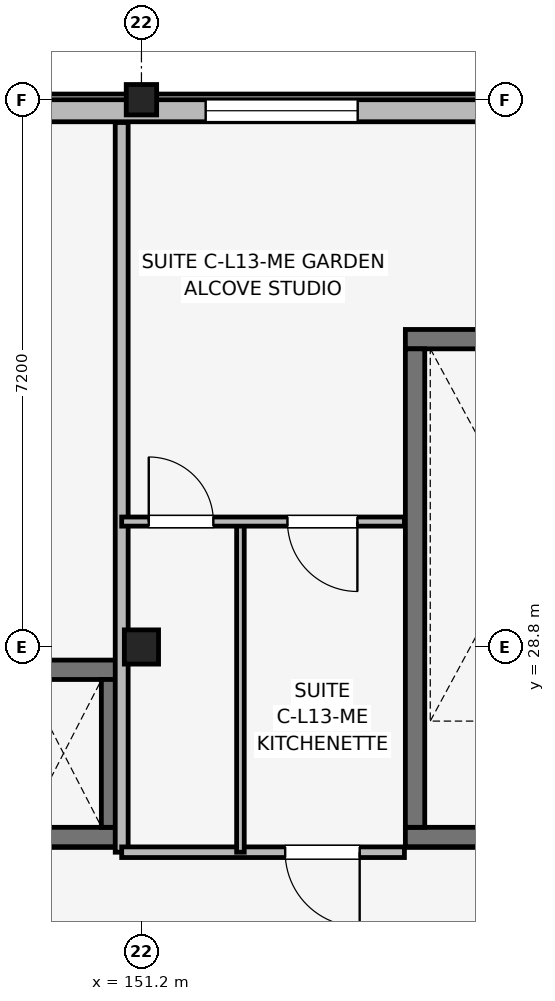
"""IFC4 building model, lengths in metres.
Left out: names, types, materials, properties, quantities, classifications, styles, units other than length and angle.
Written with IfcOpenShell. Run it as: python <this file> out.ifc"""

import sys

from ifc_helpers import new_model, si_unit, direction, frame, frame_2d, origin, origin_2d, place, context, subcontext, project, spatial, rectangle, extrude, element, fill, save


model = new_model("IFC4")
c1 = context("Model", 3, precision=1e-05, world=origin(), true_north=direction((0.0, 1.0)))
c2 = subcontext(c1, "Body", "Model", "MODEL_VIEW")
j1 = project(units=[si_unit("LENGTHUNIT", "METRE"), si_unit("PLANEANGLEUNIT", "RADIAN")], contexts=[c1])
p1 = place(None, origin())
s1 = spatial("IfcSite", under=j1, at=p1, CompositionType="ELEMENT")
p2 = place(p1, origin())
s2 = spatial("IfcBuilding", under=s1, at=p2, CompositionType="ELEMENT")
p3 = place(p2, frame((0.0, 0.0, 43.35)))
s3 = spatial("IfcBuildingStorey", under=s2, at=p3, CompositionType="ELEMENT", Elevation=43.35)
p4 = place(p3, frame((151.2, 28.8, 0.0), z_axis=(0.0, 0.0, 1.0), x_axis=(1.0, 0.0, 0.0)))
e1 = element("IfcColumn", 1, at=p4, inside=s3, PredefinedType="COLUMN", context=c2, shape_type="SweptSolid", body=[
    extrude(rectangle(XDim=0.45, YDim=0.45, at=origin_2d()), origin(), (0.0, 0.0, 1.0), 3.15),
])
p5 = place(p3, frame((151.2, 36.0, 0.0), z_axis=(0.0, 0.0, 1.0), x_axis=(1.0, 0.0, 0.0)))
e2 = element("IfcColumn", 2, at=p5, inside=s3, PredefinedType="COLUMN", context=c2, shape_type="SweptSolid", body=[
    extrude(rectangle(XDim=0.4, YDim=0.4, at=origin_2d()), origin(), (0.0, 0.0, 1.0), 3.15),
])
p6 = place(p3, frame((154.673, 26.3, 0.0), z_axis=(0.0, 0.0, 1.0), x_axis=(1.0, 0.0, 0.0)))
e3 = element("IfcWall", 3, at=p6, inside=s3, PredefinedType="SHEAR", context=c2, shape_type="SweptSolid", body=[
    extrude(rectangle(XDim=3.305, YDim=0.255, at=frame_2d((1.652, 0.0))), origin(), (0.0, 0.0, 1.0), 3.15),
])
p7 = place(p6, frame((1.127, 0.0, 0.0)))
e4 = element("IfcOpeningElement", 4, at=p7, cuts=e3, PredefinedType="OPENING", context=c2, shape_type="SweptSolid", body=[
    extrude(rectangle(XDim=1.05, YDim=2.12, at=frame_2d((0.525, 1.06))), frame((0.0, 0.137, 0.0), z_axis=(0.0, -1.0, 0.0), x_axis=(1.0, 0.0, 0.0)), (0.0, 0.0, 1.0), 0.275),
])
p8 = place(p3, frame((154.673, 32.85, 0.0), z_axis=(0.0, 0.0, 1.0), x_axis=(1.0, 0.0, 0.0)))
e5 = element("IfcWall", 5, at=p8, inside=s3, PredefinedType="SHEAR", context=c2, shape_type="SweptSolid", body=[
    extrude(rectangle(XDim=3.305, YDim=0.255, at=frame_2d((1.652, 0.0))), origin(), (0.0, 0.0, 1.0), 3.15),
])
p9 = place(p3, frame((154.8, 26.427, 0.0), z_axis=(0.0, 0.0, 1.0), x_axis=(0.0, 1.0, 0.0)))
e6 = element("IfcWall", 6, at=p9, inside=s3, PredefinedType="SHEAR", context=c2, shape_type="SweptSolid", body=[
    extrude(rectangle(XDim=6.295, YDim=0.255, at=frame_2d((3.147, 0.0))), origin(), (0.0, 0.0, 1.0), 3.15),
])
for number, where, z_axis, x_axis in (
    (7, (149.123, 26.3, 0.0), (0.0, 0.0, 1.0), (1.0, 0.0, 0.0)),
    (8, (149.123, 28.5, 0.0), (0.0, 0.0, 1.0), (1.0, 0.0, 0.0)),
):
    element("IfcWall", number, at=place(p3, frame(where, z_axis=z_axis, x_axis=x_axis)), inside=s3, PredefinedType="SHEAR", context=c2, shape_type="SweptSolid", body=[
        extrude(rectangle(XDim=1.805, YDim=0.255, at=frame_2d((0.902, 0.0))), origin(), (0.0, 0.0, 1.0), 3.15),
    ])
p10 = place(p3, frame((150.8, 26.427, 0.0), z_axis=(0.0, 0.0, 1.0), x_axis=(0.0, 1.0, 0.0)))
e9 = element("IfcWall", 9, at=p10, inside=s3, PredefinedType="SHEAR", context=c2, shape_type="SweptSolid", body=[
    extrude(rectangle(XDim=1.945, YDim=0.255, at=frame_2d((0.973, 0.0))), origin(), (0.0, 0.0, 1.0), 3.15),
])
p11 = place(p3, frame((163.4, 35.855, 0.0), z_axis=(0.0, 0.0, 1.0), x_axis=(-1.0, 0.0, 0.0)))
e10 = element("IfcWall", 10, at=p11, inside=s3, PredefinedType="SOLIDWALL", context=c2, shape_type="SweptSolid", body=[
    extrude(rectangle(XDim=31.6, YDim=0.29, at=frame_2d((15.8, 0.0))), origin(), (0.0, 0.0, 1.0), 2.45),
])
p12 = place(p11, frame((15.35, 0.0, 0.5)))
e11 = element("IfcOpeningElement", 11, at=p12, cuts=e10, PredefinedType="OPENING", context=c2, shape_type="SweptSolid", body=[
    extrude(rectangle(XDim=0.9, YDim=1.8, at=frame_2d((0.45, 0.9))), frame((0.0, 0.155, 0.0), z_axis=(0.0, -1.0, 0.0), x_axis=(1.0, 0.0, 0.0)), (0.0, 0.0, 1.0), 0.31),
])
p13 = place(p11, frame((1.605, 0.0, 0.7)))
e12 = element("IfcOpeningElement", 12, at=p13, cuts=e10, PredefinedType="OPENING", context=c2, shape_type="SweptSolid", body=[
    extrude(rectangle(XDim=1.72, YDim=1.6, at=frame_2d((0.86, 0.8))), frame((0.0, 0.155, 0.0), z_axis=(0.0, -1.0, 0.0), x_axis=(1.0, 0.0, 0.0)), (0.0, 0.0, 1.0), 0.31),
])
p14 = place(p11, frame((28.205, 0.0, 0.7)))
e13 = element("IfcOpeningElement", 13, at=p14, cuts=e10, PredefinedType="OPENING", context=c2, shape_type="SweptSolid", body=[
    extrude(rectangle(XDim=1.86, YDim=1.6, at=frame_2d((0.93, 0.8))), frame((0.0, 0.155, 0.0), z_axis=(0.0, -1.0, 0.0), x_axis=(1.0, 0.0, 0.0)), (0.0, 0.0, 1.0), 0.31),
])
p15 = place(p11, frame((9.355, 0.0, 0.69)))
e14 = element("IfcOpeningElement", 14, at=p15, cuts=e10, PredefinedType="OPENING", context=c2, shape_type="SweptSolid", body=[
    extrude(rectangle(XDim=2.0, YDim=1.65, at=frame_2d((1.0, 0.825))), frame((0.0, 0.155, 0.0), z_axis=(0.0, -1.0, 0.0), x_axis=(1.0, 0.0, 0.0)), (0.0, 0.0, 1.0), 0.31),
])
p16 = place(p11, frame((20.145, 0.0, 0.69)))
e15 = element("IfcOpeningElement", 15, at=p16, cuts=e10, PredefinedType="OPENING", context=c2, shape_type="SweptSolid", body=[
    extrude(rectangle(XDim=2.15, YDim=1.65, at=frame_2d((1.075, 0.825))), frame((0.0, 0.155, 0.0), z_axis=(0.0, -1.0, 0.0), x_axis=(1.0, 0.0, 0.0)), (0.0, 0.0, 1.0), 0.31),
])
p17 = place(p3, frame((150.94, 26.1, 0.0), z_axis=(0.0, 0.0, 1.0), x_axis=(0.0, 1.0, 0.0)))
e16 = element("IfcWall", 16, at=p17, inside=s3, PredefinedType="PARTITIONING", context=c2, shape_type="SweptSolid", body=[
    extrude(rectangle(XDim=9.6, YDim=0.17, at=frame_2d((4.8, 0.0))), origin(), (0.0, 0.0, 1.0), 2.38),
])
p18 = place(p3, frame((150.94, 26.1, 0.0), z_axis=(0.0, 0.0, 1.0), x_axis=(1.0, 0.0, 0.0)))
e17 = element("IfcWall", 17, at=p18, inside=s3, PredefinedType="PARTITIONING", context=c2, shape_type="SweptSolid", body=[
    extrude(rectangle(XDim=3.72, YDim=0.14, at=frame_2d((1.86, 0.0))), origin(), (0.0, 0.0, 1.0), 2.38),
])
p19 = place(p18, frame((3.131, 0.0, 0.0), z_axis=(0.0, 0.0, 1.0), x_axis=(-1.0, 0.0, 0.0)))
e18 = element("IfcOpeningElement", 18, at=p19, cuts=e17, PredefinedType="OPENING", context=c2, shape_type="SweptSolid", body=[
    extrude(rectangle(XDim=0.98, YDim=2.1, at=frame_2d((0.49, 1.05))), frame((0.0, 0.08, 0.0), z_axis=(0.0, -1.0, 0.0), x_axis=(1.0, 0.0, 0.0)), (0.0, 0.0, 1.0), 0.16),
])
p20 = place(p3, frame((152.502, 26.1, 0.0), z_axis=(0.0, 0.0, 1.0), x_axis=(0.0, 1.0, 0.0)))
e19 = element("IfcWall", 19, at=p20, inside=s3, PredefinedType="PARTITIONING", context=c2, shape_type="SweptSolid", body=[
    extrude(rectangle(XDim=4.35, YDim=0.1, at=frame_2d((2.175, 0.0))), origin(), (0.0, 0.0, 1.0), 2.38),
])
p21 = place(p3, frame((150.94, 30.45, 0.0), z_axis=(0.0, 0.0, 1.0), x_axis=(1.0, 0.0, 0.0)))
e20 = element("IfcWall", 20, at=p21, inside=s3, PredefinedType="PARTITIONING", context=c2, shape_type="SweptSolid", body=[
    extrude(rectangle(XDim=3.72, YDim=0.12, at=frame_2d((1.86, 0.0))), origin(), (0.0, 0.0, 1.0), 2.38),
])
p22 = place(p21, frame((0.356, 0.0, 0.0)))
e21 = element("IfcOpeningElement", 21, at=p22, cuts=e20, PredefinedType="OPENING", context=c2, shape_type="SweptSolid", body=[
    extrude(rectangle(XDim=0.85, YDim=2.08, at=frame_2d((0.425, 1.04))), frame((0.0, 0.07, 0.0), z_axis=(0.0, -1.0, 0.0), x_axis=(1.0, 0.0, 0.0)), (0.0, 0.0, 1.0), 0.14),
])
p23 = place(p21, frame((3.101, 0.0, 0.0), z_axis=(0.0, 0.0, 1.0), x_axis=(-1.0, 0.0, 0.0)))
e22 = element("IfcOpeningElement", 22, at=p23, cuts=e20, PredefinedType="OPENING", context=c2, shape_type="SweptSolid", body=[
    extrude(rectangle(XDim=0.92, YDim=2.08, at=frame_2d((0.46, 1.04))), frame((0.0, 0.07, 0.0), z_axis=(0.0, -1.0, 0.0), x_axis=(1.0, 0.0, 0.0)), (0.0, 0.0, 1.0), 0.14),
])
p24 = place(p15, origin())
e23 = element("IfcWindow", 23, at=p24, inside=s3, PartitioningType="SINGLE_PANEL", PredefinedType="WINDOW", context=c2, shape_type="SweptSolid", body=[
    extrude(rectangle(XDim=2.0, YDim=1.65, at=frame_2d((1.0, 0.825))), frame((0.0, 0.03, 0.0), z_axis=(0.0, -1.0, 0.0), x_axis=(1.0, 0.0, 0.0)), (0.0, 0.0, 1.0), 0.06),
])
fill(e14, e23)
p25 = place(p19, origin())
e24 = element("IfcDoor", 24, at=p25, inside=s3, OperationType="SINGLE_SWING_RIGHT", PredefinedType="DOOR", context=c2, shape_type="SweptSolid", body=[
    extrude(rectangle(XDim=0.98, YDim=2.1, at=frame_2d((0.49, 1.05))), frame((0.0, 0.025, 0.0), z_axis=(0.0, -1.0, 0.0), x_axis=(1.0, 0.0, 0.0)), (0.0, 0.0, 1.0), 0.05),
])
fill(e18, e24)
p26 = place(p22, origin())
e25 = element("IfcDoor", 25, at=p26, inside=s3, OperationType="SINGLE_SWING_LEFT", PredefinedType="DOOR", context=c2, shape_type="SweptSolid", body=[
    extrude(rectangle(XDim=0.85, YDim=2.08, at=frame_2d((0.425, 1.04))), frame((0.0, 0.025, 0.0), z_axis=(0.0, -1.0, 0.0), x_axis=(1.0, 0.0, 0.0)), (0.0, 0.0, 1.0), 0.05),
])
fill(e21, e25)
p27 = place(p23, origin())
e26 = element("IfcDoor", 26, at=p27, inside=s3, OperationType="SINGLE_SWING_RIGHT", PredefinedType="DOOR", context=c2, shape_type="SweptSolid", body=[
    extrude(rectangle(XDim=0.92, YDim=2.08, at=frame_2d((0.46, 1.04))), frame((0.0, 0.025, 0.0), z_axis=(0.0, -1.0, 0.0), x_axis=(1.0, 0.0, 0.0)), (0.0, 0.0, 1.0), 0.05),
])
fill(e22, e26)
save(model, sys.argv[1])
